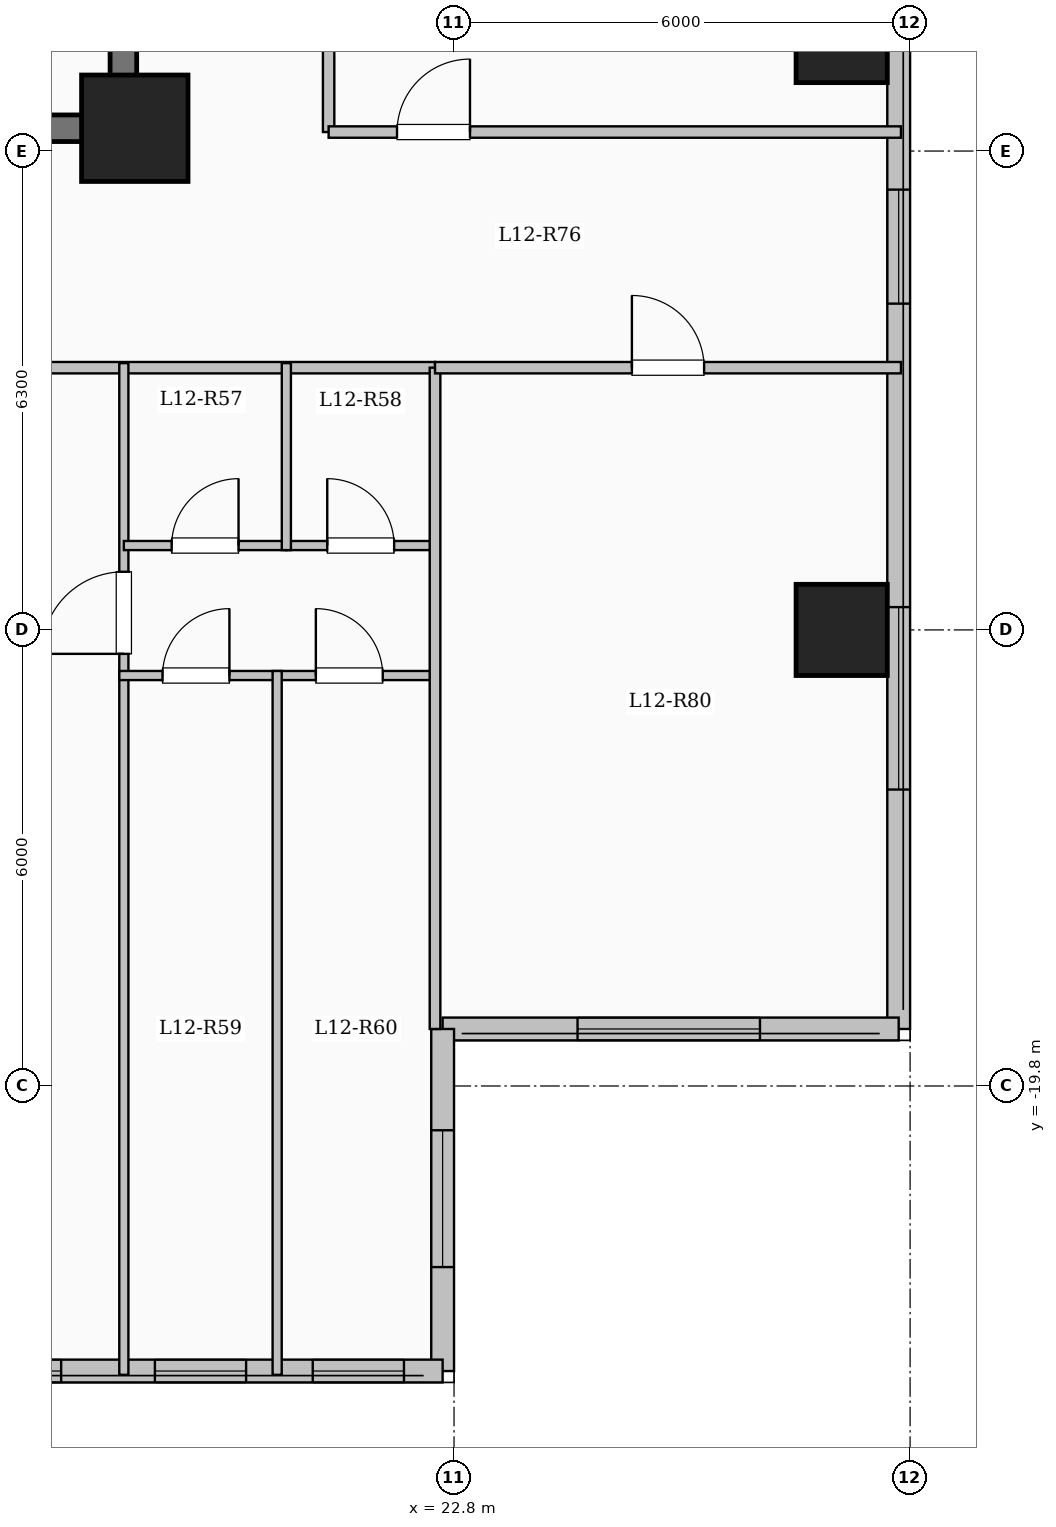
"""IFC4 building model, lengths in metres.
Left out: names, types, materials, properties, quantities, classifications, styles, units other than length and angle.
Written with IfcOpenShell. Run it as: python <this file> out.ifc"""

import sys

from ifc_helpers import new_model, si_unit, direction, frame, frame_2d, origin, origin_2d, place, context, subcontext, project, spatial, rectangle, extrude, element, fill, save


model = new_model("IFC4")
c1 = context("Model", 3, precision=1e-05, world=origin(), true_north=direction((0.0, 1.0)))
c2 = subcontext(c1, "Body", "Model", "MODEL_VIEW")
j1 = project(units=[si_unit("LENGTHUNIT", "METRE"), si_unit("PLANEANGLEUNIT", "RADIAN")], contexts=[c1])
p1 = place(None, origin())
s1 = spatial("IfcSite", under=j1, at=p1, CompositionType="ELEMENT")
p2 = place(p1, origin())
s2 = spatial("IfcBuilding", under=s1, at=p2, CompositionType="ELEMENT")
p3 = place(p2, frame((0.0, 0.0, 47.45)))
s3 = spatial("IfcBuildingStorey", under=s2, at=p3, CompositionType="ELEMENT", Elevation=47.45)
p4 = place(p3, frame((18.6, -7.2, 0.0), z_axis=(0.0, 0.0, 1.0), x_axis=(1.0, 0.0, 0.0)))
e1 = element("IfcColumn", 1, at=p4, inside=s3, PredefinedType="COLUMN", context=c2, shape_type="SweptSolid", body=[
    extrude(rectangle(XDim=1.4, YDim=1.4, at=origin_2d()), origin(), (0.0, 0.0, 1.0), 3.35),
])
for number, where, z_axis, x_axis in (
    (2, (27.9, -13.8, 0.0), (0.0, 0.0, 1.0), (1.0, 0.0, 0.0)),
    (3, (27.9, -6.0, 0.0), (0.0, 0.0, 1.0), (1.0, 0.0, 0.0)),
):
    element("IfcColumn", number, at=place(p3, frame(where, z_axis=z_axis, x_axis=x_axis)), inside=s3, PredefinedType="COLUMN", context=c2, shape_type="SweptSolid", body=[
        extrude(rectangle(XDim=1.2, YDim=1.2, at=origin_2d()), origin(), (0.0, 0.0, 1.0), 3.35),
    ])
p5 = place(p3, frame((28.65, 19.05, 0.0), z_axis=(0.0, 0.0, 1.0), x_axis=(0.0, -1.0, 0.0)))
e4 = element("IfcWall", 4, at=p5, inside=s3, PredefinedType="SOLIDWALL", context=c2, shape_type="SweptSolid", body=[
    extrude(rectangle(XDim=38.1, YDim=0.3, at=frame_2d((19.05, 0.0))), origin(), (0.0, 0.0, 1.0), 3.1),
])
p6 = place(p5, frame((2.275, 0.0, 0.9)))
e5 = element("IfcOpeningElement", 5, at=p6, cuts=e4, PredefinedType="OPENING", context=c2, shape_type="SweptSolid", body=[
    extrude(rectangle(XDim=2.0, YDim=1.7, at=frame_2d((1.0, 0.85))), frame((0.0, 0.16, 0.0), z_axis=(0.0, -1.0, 0.0), x_axis=(1.0, 0.0, 0.0)), (0.0, 0.0, 1.0), 0.32),
])
p7 = place(p5, frame((6.925, 0.0, 0.95)))
e6 = element("IfcOpeningElement", 6, at=p7, cuts=e4, PredefinedType="OPENING", context=c2, shape_type="SweptSolid", body=[
    extrude(rectangle(XDim=1.0, YDim=1.5, at=frame_2d((0.5, 0.75))), frame((0.0, 0.16, 0.0), z_axis=(0.0, -1.0, 0.0), x_axis=(1.0, 0.0, 0.0)), (0.0, 0.0, 1.0), 0.32),
])
p8 = place(p5, frame((10.175, 0.0, 0.9)))
e7 = element("IfcOpeningElement", 7, at=p8, cuts=e4, PredefinedType="OPENING", context=c2, shape_type="SweptSolid", body=[
    extrude(rectangle(XDim=2.0, YDim=1.7, at=frame_2d((1.0, 0.85))), frame((0.0, 0.16, 0.0), z_axis=(0.0, -1.0, 0.0), x_axis=(1.0, 0.0, 0.0)), (0.0, 0.0, 1.0), 0.32),
])
p9 = place(p5, frame((14.925, 0.0, 0.9)))
e8 = element("IfcOpeningElement", 8, at=p9, cuts=e4, PredefinedType="OPENING", context=c2, shape_type="SweptSolid", body=[
    extrude(rectangle(XDim=1.8, YDim=1.65, at=frame_2d((0.9, 0.825))), frame((0.0, 0.16, 0.0), z_axis=(0.0, -1.0, 0.0), x_axis=(1.0, 0.0, 0.0)), (0.0, 0.0, 1.0), 0.32),
])
p10 = place(p5, frame((20.75, 0.0, 0.9)))
e9 = element("IfcOpeningElement", 9, at=p10, cuts=e4, PredefinedType="OPENING", context=c2, shape_type="SweptSolid", body=[
    extrude(rectangle(XDim=2.4, YDim=1.8, at=frame_2d((1.2, 0.9))), frame((0.0, 0.16, 0.0), z_axis=(0.0, -1.0, 0.0), x_axis=(1.0, 0.0, 0.0)), (0.0, 0.0, 1.0), 0.32),
])
p11 = place(p5, frame((27.058, 0.0, 0.9)))
e10 = element("IfcOpeningElement", 10, at=p11, cuts=e4, PredefinedType="OPENING", context=c2, shape_type="SweptSolid", body=[
    extrude(rectangle(XDim=1.5, YDim=1.65, at=frame_2d((0.75, 0.825))), frame((0.0, 0.16, 0.0), z_axis=(0.0, -1.0, 0.0), x_axis=(1.0, 0.0, 0.0)), (0.0, 0.0, 1.0), 0.32),
])
p12 = place(p5, frame((32.55, 0.0, 0.9)))
e11 = element("IfcOpeningElement", 11, at=p12, cuts=e4, PredefinedType="OPENING", context=c2, shape_type="SweptSolid", body=[
    extrude(rectangle(XDim=2.4, YDim=1.8, at=frame_2d((1.2, 0.9))), frame((0.0, 0.16, 0.0), z_axis=(0.0, -1.0, 0.0), x_axis=(1.0, 0.0, 0.0)), (0.0, 0.0, 1.0), 0.32),
])
p13 = place(p3, frame((28.65, -19.05, 0.0), z_axis=(0.0, 0.0, 1.0), x_axis=(-1.0, 0.0, 0.0)))
e12 = element("IfcWall", 12, at=p13, inside=s3, PredefinedType="SOLIDWALL", context=c2, shape_type="SweptSolid", body=[
    extrude(rectangle(XDim=6.0, YDim=0.3, at=frame_2d((3.0, 0.0))), origin(), (0.0, 0.0, 1.0), 3.1),
])
p14 = place(p13, frame((1.825, 0.0, 0.9)))
e13 = element("IfcOpeningElement", 13, at=p14, cuts=e12, PredefinedType="OPENING", context=c2, shape_type="SweptSolid", body=[
    extrude(rectangle(XDim=2.4, YDim=1.8, at=frame_2d((1.2, 0.9))), frame((0.0, 0.16, 0.0), z_axis=(0.0, -1.0, 0.0), x_axis=(1.0, 0.0, 0.0)), (0.0, 0.0, 1.0), 0.32),
])
p15 = place(p3, frame((22.65, -19.05, 0.0), z_axis=(0.0, 0.0, 1.0), x_axis=(0.0, -1.0, 0.0)))
e14 = element("IfcWall", 14, at=p15, inside=s3, PredefinedType="SOLIDWALL", context=c2, shape_type="SweptSolid", body=[
    extrude(rectangle(XDim=4.5, YDim=0.3, at=frame_2d((2.25, 0.0))), origin(), (0.0, 0.0, 1.0), 3.1),
])
p16 = place(p15, frame((1.333, 0.0, 0.9)))
e15 = element("IfcOpeningElement", 15, at=p16, cuts=e14, PredefinedType="OPENING", context=c2, shape_type="SweptSolid", body=[
    extrude(rectangle(XDim=1.8, YDim=1.65, at=frame_2d((0.9, 0.825))), frame((0.0, 0.16, 0.0), z_axis=(0.0, -1.0, 0.0), x_axis=(1.0, 0.0, 0.0)), (0.0, 0.0, 1.0), 0.32),
])
p17 = place(p3, frame((22.65, -23.55, 0.0), z_axis=(0.0, 0.0, 1.0), x_axis=(-1.0, 0.0, 0.0)))
e16 = element("IfcWall", 16, at=p17, inside=s3, PredefinedType="SOLIDWALL", context=c2, shape_type="SweptSolid", body=[
    extrude(rectangle(XDim=15.3, YDim=0.3, at=frame_2d((7.65, 0.0))), origin(), (0.0, 0.0, 1.0), 3.1),
])
p18 = place(p17, frame((0.509, 0.0, 0.95)))
e17 = element("IfcOpeningElement", 17, at=p18, cuts=e16, PredefinedType="OPENING", context=c2, shape_type="SweptSolid", body=[
    extrude(rectangle(XDim=1.2, YDim=1.5, at=frame_2d((0.6, 0.75))), frame((0.0, 0.16, 0.0), z_axis=(0.0, -1.0, 0.0), x_axis=(1.0, 0.0, 0.0)), (0.0, 0.0, 1.0), 0.32),
])
p19 = place(p17, frame((2.585, 0.0, 0.95)))
e18 = element("IfcOpeningElement", 18, at=p19, cuts=e16, PredefinedType="OPENING", context=c2, shape_type="SweptSolid", body=[
    extrude(rectangle(XDim=1.2, YDim=1.5, at=frame_2d((0.6, 0.75))), frame((0.0, 0.16, 0.0), z_axis=(0.0, -1.0, 0.0), x_axis=(1.0, 0.0, 0.0)), (0.0, 0.0, 1.0), 0.32),
])
p20 = place(p17, frame((5.019, 0.0, 0.9)))
e19 = element("IfcOpeningElement", 19, at=p20, cuts=e16, PredefinedType="OPENING", context=c2, shape_type="SweptSolid", body=[
    extrude(rectangle(XDim=1.5, YDim=1.65, at=frame_2d((0.75, 0.825))), frame((0.0, 0.16, 0.0), z_axis=(0.0, -1.0, 0.0), x_axis=(1.0, 0.0, 0.0)), (0.0, 0.0, 1.0), 0.32),
])
p21 = place(p17, frame((8.204, 0.0, 0.9)))
e20 = element("IfcOpeningElement", 20, at=p21, cuts=e16, PredefinedType="OPENING", context=c2, shape_type="SweptSolid", body=[
    extrude(rectangle(XDim=1.5, YDim=1.65, at=frame_2d((0.75, 0.825))), frame((0.0, 0.16, 0.0), z_axis=(0.0, -1.0, 0.0), x_axis=(1.0, 0.0, 0.0)), (0.0, 0.0, 1.0), 0.32),
])
p22 = place(p17, frame((11.415, 0.0, 0.9)))
e21 = element("IfcOpeningElement", 21, at=p22, cuts=e16, PredefinedType="OPENING", context=c2, shape_type="SweptSolid", body=[
    extrude(rectangle(XDim=1.8, YDim=1.65, at=frame_2d((0.9, 0.825))), frame((0.0, 0.16, 0.0), z_axis=(0.0, -1.0, 0.0), x_axis=(1.0, 0.0, 0.0)), (0.0, 0.0, 1.0), 0.32),
])
p23 = place(p17, frame((14.303, 0.0, 0.95)))
e22 = element("IfcOpeningElement", 22, at=p23, cuts=e16, PredefinedType="OPENING", context=c2, shape_type="SweptSolid", body=[
    extrude(rectangle(XDim=0.85, YDim=1.5, at=frame_2d((0.425, 0.75))), frame((0.0, 0.16, 0.0), z_axis=(0.0, -1.0, 0.0), x_axis=(1.0, 0.0, 0.0)), (0.0, 0.0, 1.0), 0.32),
])
p24 = place(p3, frame((18.45, -7.375, 0.0), z_axis=(0.0, 0.0, 1.0), x_axis=(0.0, 1.0, 0.0)))
e23 = element("IfcWall", 23, at=p24, inside=s3, PredefinedType="SHEAR", context=c2, shape_type="SweptSolid", body=[
    extrude(rectangle(XDim=14.05, YDim=0.35, at=frame_2d((7.025, 0.0))), origin(), (0.0, 0.0, 1.0), 3.35),
])
p25 = place(p3, frame((10.075, -7.2, 0.0), z_axis=(0.0, 0.0, 1.0), x_axis=(1.0, 0.0, 0.0)))
e24 = element("IfcWall", 24, at=p25, inside=s3, PredefinedType="SHEAR", context=c2, shape_type="SweptSolid", body=[
    extrude(rectangle(XDim=8.55, YDim=0.35, at=frame_2d((4.275, 0.0))), origin(), (0.0, 0.0, 1.0), 3.35),
])
p26 = place(p3, frame((21.15, -7.25, 0.0), z_axis=(0.0, 0.0, 1.0), x_axis=(0.0, 1.0, 0.0)))
e25 = element("IfcWall", 25, at=p26, inside=s3, PredefinedType="PARTITIONING", context=c2, shape_type="SweptSolid", body=[
    extrude(rectangle(XDim=18.0, YDim=0.15, at=frame_2d((9.0, 0.0))), origin(), (0.0, 0.0, 1.0), 2.585),
])
p27 = place(p3, frame((8.55, -10.35, 0.0), z_axis=(0.0, 0.0, 1.0), x_axis=(1.0, 0.0, 0.0)))
e26 = element("IfcWall", 26, at=p27, inside=s3, PredefinedType="PARTITIONING", context=c2, shape_type="SweptSolid", body=[
    extrude(rectangle(XDim=14.0, YDim=0.15, at=frame_2d((7.0, 0.0))), origin(), (0.0, 0.0, 1.0), 3.1),
])
p28 = place(p27, frame((0.75, 0.0, 0.0)))
e27 = element("IfcOpeningElement", 27, at=p28, cuts=e26, PredefinedType="OPENING", context=c2, shape_type="SweptSolid", body=[
    extrude(rectangle(XDim=0.96, YDim=2.15, at=frame_2d((0.48, 1.075))), frame((0.0, 0.085, 0.0), z_axis=(0.0, -1.0, 0.0), x_axis=(1.0, 0.0, 0.0)), (0.0, 0.0, 1.0), 0.17),
])
p29 = place(p27, frame((7.446, 0.0, 0.0)))
e28 = element("IfcOpeningElement", 28, at=p29, cuts=e26, PredefinedType="OPENING", context=c2, shape_type="SweptSolid", body=[
    extrude(rectangle(XDim=0.96, YDim=2.15, at=frame_2d((0.48, 1.075))), frame((0.0, 0.085, 0.0), z_axis=(0.0, -1.0, 0.0), x_axis=(1.0, 0.0, 0.0)), (0.0, 0.0, 1.0), 0.17),
])
p30 = place(p3, frame((18.456, -23.6, 0.0), z_axis=(0.0, 0.0, 1.0), x_axis=(0.0, 1.0, 0.0)))
e29 = element("IfcWall", 29, at=p30, inside=s3, PredefinedType="PARTITIONING", context=c2, shape_type="SweptSolid", body=[
    extrude(rectangle(XDim=13.31, YDim=0.12, at=frame_2d((6.655, 0.0))), origin(), (0.0, 0.0, 1.0), 3.1),
])
p31 = place(p30, frame((9.485, 0.0, 0.0)))
e30 = element("IfcOpeningElement", 30, at=p31, cuts=e29, PredefinedType="OPENING", context=c2, shape_type="SweptSolid", body=[
    extrude(rectangle(XDim=1.08, YDim=2.15, at=frame_2d((0.54, 1.075))), frame((0.0, 0.07, 0.0), z_axis=(0.0, -1.0, 0.0), x_axis=(1.0, 0.0, 0.0)), (0.0, 0.0, 1.0), 0.14),
])
p32 = place(p3, frame((18.456, -12.69, 0.0), z_axis=(0.0, 0.0, 1.0), x_axis=(1.0, 0.0, 0.0)))
e31 = element("IfcWall", 31, at=p32, inside=s3, PredefinedType="PARTITIONING", context=c2, shape_type="SweptSolid", body=[
    extrude(rectangle(XDim=2.138, YDim=0.12, at=frame_2d((1.069, 0.0))), origin(), (0.0, 0.0, 1.0), 3.1),
])
p33 = place(p32, frame((0.629, 0.0, 0.0)))
e32 = element("IfcOpeningElement", 32, at=p33, cuts=e31, PredefinedType="OPENING", context=c2, shape_type="SweptSolid", body=[
    extrude(rectangle(XDim=0.88, YDim=2.1, at=frame_2d((0.44, 1.05))), frame((0.0, 0.07, 0.0), z_axis=(0.0, -1.0, 0.0), x_axis=(1.0, 0.0, 0.0)), (0.0, 0.0, 1.0), 0.14),
])
p34 = place(p3, frame((20.594, -12.69, 0.0), z_axis=(0.0, 0.0, 1.0), x_axis=(1.0, 0.0, 0.0)))
e33 = element("IfcWall", 33, at=p34, inside=s3, PredefinedType="PARTITIONING", context=c2, shape_type="SweptSolid", body=[
    extrude(rectangle(XDim=1.956, YDim=0.12, at=frame_2d((0.978, 0.0))), origin(), (0.0, 0.0, 1.0), 3.1),
])
p35 = place(p34, frame((0.538, 0.0, 0.0)))
e34 = element("IfcOpeningElement", 34, at=p35, cuts=e33, PredefinedType="OPENING", context=c2, shape_type="SweptSolid", body=[
    extrude(rectangle(XDim=0.88, YDim=2.1, at=frame_2d((0.44, 1.05))), frame((0.0, 0.07, 0.0), z_axis=(0.0, -1.0, 0.0), x_axis=(1.0, 0.0, 0.0)), (0.0, 0.0, 1.0), 0.14),
])
p36 = place(p3, frame((18.396, -14.4, 0.0), z_axis=(0.0, 0.0, 1.0), x_axis=(1.0, 0.0, 0.0)))
e35 = element("IfcWall", 35, at=p36, inside=s3, PredefinedType="PARTITIONING", context=c2, shape_type="SweptSolid", body=[
    extrude(rectangle(XDim=4.214, YDim=0.12, at=frame_2d((2.107, 0.0))), origin(), (0.0, 0.0, 1.0), 3.1),
])
p37 = place(p36, frame((0.569, 0.0, 0.0)))
e36 = element("IfcOpeningElement", 36, at=p37, cuts=e35, PredefinedType="OPENING", context=c2, shape_type="SweptSolid", body=[
    extrude(rectangle(XDim=0.88, YDim=2.1, at=frame_2d((0.44, 1.05))), frame((0.0, 0.07, 0.0), z_axis=(0.0, -1.0, 0.0), x_axis=(1.0, 0.0, 0.0)), (0.0, 0.0, 1.0), 0.14),
])
p38 = place(p36, frame((2.586, 0.0, 0.0)))
e37 = element("IfcOpeningElement", 37, at=p38, cuts=e35, PredefinedType="OPENING", context=c2, shape_type="SweptSolid", body=[
    extrude(rectangle(XDim=0.88, YDim=2.1, at=frame_2d((0.44, 1.05))), frame((0.0, 0.07, 0.0), z_axis=(0.0, -1.0, 0.0), x_axis=(1.0, 0.0, 0.0)), (0.0, 0.0, 1.0), 0.14),
])
p39 = place(p3, frame((20.594, -12.75, 0.0), z_axis=(0.0, 0.0, 1.0), x_axis=(0.0, 1.0, 0.0)))
e38 = element("IfcWall", 38, at=p39, inside=s3, PredefinedType="PARTITIONING", context=c2, shape_type="SweptSolid", body=[
    extrude(rectangle(XDim=2.46, YDim=0.12, at=frame_2d((1.23, 0.0))), origin(), (0.0, 0.0, 1.0), 3.1),
])
p40 = place(p3, frame((20.473, -23.6, 0.0), z_axis=(0.0, 0.0, 1.0), x_axis=(0.0, 1.0, 0.0)))
e39 = element("IfcWall", 39, at=p40, inside=s3, PredefinedType="PARTITIONING", context=c2, shape_type="SweptSolid", body=[
    extrude(rectangle(XDim=9.26, YDim=0.12, at=frame_2d((4.63, 0.0))), origin(), (0.0, 0.0, 1.0), 3.1),
])
p41 = place(p3, frame((21.15, -7.25, 0.0), z_axis=(0.0, 0.0, 1.0), x_axis=(1.0, 0.0, 0.0)))
e40 = element("IfcWall", 40, at=p41, inside=s3, PredefinedType="PARTITIONING", context=c2, shape_type="SweptSolid", body=[
    extrude(rectangle(XDim=7.53, YDim=0.15, at=frame_2d((3.765, 0.0))), origin(), (0.0, 0.0, 1.0), 3.1),
])
p42 = place(p41, frame((0.9, 0.0, 0.0)))
e41 = element("IfcOpeningElement", 41, at=p42, cuts=e40, PredefinedType="OPENING", context=c2, shape_type="SweptSolid", body=[
    extrude(rectangle(XDim=0.96, YDim=2.15, at=frame_2d((0.48, 1.075))), frame((0.0, 0.085, 0.0), z_axis=(0.0, -1.0, 0.0), x_axis=(1.0, 0.0, 0.0)), (0.0, 0.0, 1.0), 0.17),
])
p43 = place(p3, frame((22.55, -19.05, 0.0), z_axis=(0.0, 0.0, 1.0), x_axis=(0.0, 1.0, 0.0)))
e42 = element("IfcWall", 42, at=p43, inside=s3, PredefinedType="PARTITIONING", context=c2, shape_type="SweptSolid", body=[
    extrude(rectangle(XDim=8.7, YDim=0.14, at=frame_2d((4.35, 0.0))), origin(), (0.0, 0.0, 1.0), 3.1),
])
p44 = place(p3, frame((22.55, -10.35, 0.0), z_axis=(0.0, 0.0, 1.0), x_axis=(1.0, 0.0, 0.0)))
e43 = element("IfcWall", 43, at=p44, inside=s3, PredefinedType="PARTITIONING", context=c2, shape_type="SweptSolid", body=[
    extrude(rectangle(XDim=6.13, YDim=0.15, at=frame_2d((3.065, 0.0))), origin(), (0.0, 0.0, 1.0), 3.1),
])
p45 = place(p44, frame((2.59, 0.0, 0.0)))
e44 = element("IfcOpeningElement", 44, at=p45, cuts=e43, PredefinedType="OPENING", context=c2, shape_type="SweptSolid", body=[
    extrude(rectangle(XDim=0.95, YDim=2.15, at=frame_2d((0.475, 1.075))), frame((0.0, 0.085, 0.0), z_axis=(0.0, -1.0, 0.0), x_axis=(1.0, 0.0, 0.0)), (0.0, 0.0, 1.0), 0.17),
])
p46 = place(p11, origin())
e45 = element("IfcWindow", 45, at=p46, inside=s3, PartitioningType="SINGLE_PANEL", PredefinedType="WINDOW", context=c2, shape_type="SweptSolid", body=[
    extrude(rectangle(XDim=1.5, YDim=1.65, at=frame_2d((0.75, 0.825))), frame((0.0, 0.03, 0.0), z_axis=(0.0, -1.0, 0.0), x_axis=(1.0, 0.0, 0.0)), (0.0, 0.0, 1.0), 0.06),
])
fill(e10, e45)
p47 = place(p12, origin())
e46 = element("IfcWindow", 46, at=p47, inside=s3, PartitioningType="SINGLE_PANEL", PredefinedType="WINDOW", context=c2, shape_type="SweptSolid", body=[
    extrude(rectangle(XDim=2.4, YDim=1.8, at=frame_2d((1.2, 0.9))), frame((0.0, 0.03, 0.0), z_axis=(0.0, -1.0, 0.0), x_axis=(1.0, 0.0, 0.0)), (0.0, 0.0, 1.0), 0.06),
])
fill(e11, e46)
p48 = place(p14, origin())
e47 = element("IfcWindow", 47, at=p48, inside=s3, PartitioningType="SINGLE_PANEL", PredefinedType="WINDOW", context=c2, shape_type="SweptSolid", body=[
    extrude(rectangle(XDim=2.4, YDim=1.8, at=frame_2d((1.2, 0.9))), frame((0.0, 0.03, 0.0), z_axis=(0.0, -1.0, 0.0), x_axis=(1.0, 0.0, 0.0)), (0.0, 0.0, 1.0), 0.06),
])
fill(e13, e47)
p49 = place(p16, origin())
e48 = element("IfcWindow", 48, at=p49, inside=s3, PartitioningType="SINGLE_PANEL", PredefinedType="WINDOW", context=c2, shape_type="SweptSolid", body=[
    extrude(rectangle(XDim=1.8, YDim=1.65, at=frame_2d((0.9, 0.825))), frame((0.0, 0.03, 0.0), z_axis=(0.0, -1.0, 0.0), x_axis=(1.0, 0.0, 0.0)), (0.0, 0.0, 1.0), 0.06),
])
fill(e15, e48)
p50 = place(p18, origin())
e49 = element("IfcWindow", 49, at=p50, inside=s3, PartitioningType="SINGLE_PANEL", PredefinedType="WINDOW", context=c2, shape_type="SweptSolid", body=[
    extrude(rectangle(XDim=1.2, YDim=1.5, at=frame_2d((0.6, 0.75))), frame((0.0, 0.03, 0.0), z_axis=(0.0, -1.0, 0.0), x_axis=(1.0, 0.0, 0.0)), (0.0, 0.0, 1.0), 0.06),
])
fill(e17, e49)
p51 = place(p19, origin())
e50 = element("IfcWindow", 50, at=p51, inside=s3, PartitioningType="SINGLE_PANEL", PredefinedType="WINDOW", context=c2, shape_type="SweptSolid", body=[
    extrude(rectangle(XDim=1.2, YDim=1.5, at=frame_2d((0.6, 0.75))), frame((0.0, 0.03, 0.0), z_axis=(0.0, -1.0, 0.0), x_axis=(1.0, 0.0, 0.0)), (0.0, 0.0, 1.0), 0.06),
])
fill(e18, e50)
p52 = place(p20, origin())
e51 = element("IfcWindow", 51, at=p52, inside=s3, PartitioningType="SINGLE_PANEL", PredefinedType="WINDOW", context=c2, shape_type="SweptSolid", body=[
    extrude(rectangle(XDim=1.5, YDim=1.65, at=frame_2d((0.75, 0.825))), frame((0.0, 0.03, 0.0), z_axis=(0.0, -1.0, 0.0), x_axis=(1.0, 0.0, 0.0)), (0.0, 0.0, 1.0), 0.06),
])
fill(e19, e51)
p53 = place(p31, origin())
e52 = element("IfcDoor", 52, at=p53, inside=s3, OperationType="SINGLE_SWING_LEFT", PredefinedType="DOOR", context=c2, shape_type="SweptSolid", body=[
    extrude(rectangle(XDim=1.08, YDim=2.15, at=frame_2d((0.54, 1.075))), frame((0.0, 0.025, 0.0), z_axis=(0.0, -1.0, 0.0), x_axis=(1.0, 0.0, 0.0)), (0.0, 0.0, 1.0), 0.05),
])
fill(e30, e52)
p54 = place(p33, origin())
e53 = element("IfcDoor", 53, at=p54, inside=s3, OperationType="SINGLE_SWING_RIGHT", PredefinedType="DOOR", context=c2, shape_type="SweptSolid", body=[
    extrude(rectangle(XDim=0.88, YDim=2.1, at=frame_2d((0.44, 1.05))), frame((0.0, 0.025, 0.0), z_axis=(0.0, -1.0, 0.0), x_axis=(1.0, 0.0, 0.0)), (0.0, 0.0, 1.0), 0.05),
])
fill(e32, e53)
p55 = place(p35, origin())
e54 = element("IfcDoor", 54, at=p55, inside=s3, OperationType="SINGLE_SWING_LEFT", PredefinedType="DOOR", context=c2, shape_type="SweptSolid", body=[
    extrude(rectangle(XDim=0.88, YDim=2.1, at=frame_2d((0.44, 1.05))), frame((0.0, 0.025, 0.0), z_axis=(0.0, -1.0, 0.0), x_axis=(1.0, 0.0, 0.0)), (0.0, 0.0, 1.0), 0.05),
])
fill(e34, e54)
p56 = place(p37, origin())
e55 = element("IfcDoor", 55, at=p56, inside=s3, OperationType="SINGLE_SWING_RIGHT", PredefinedType="DOOR", context=c2, shape_type="SweptSolid", body=[
    extrude(rectangle(XDim=0.88, YDim=2.1, at=frame_2d((0.44, 1.05))), frame((0.0, 0.025, 0.0), z_axis=(0.0, -1.0, 0.0), x_axis=(1.0, 0.0, 0.0)), (0.0, 0.0, 1.0), 0.05),
])
fill(e36, e55)
p57 = place(p38, origin())
e56 = element("IfcDoor", 56, at=p57, inside=s3, OperationType="SINGLE_SWING_LEFT", PredefinedType="DOOR", context=c2, shape_type="SweptSolid", body=[
    extrude(rectangle(XDim=0.88, YDim=2.1, at=frame_2d((0.44, 1.05))), frame((0.0, 0.025, 0.0), z_axis=(0.0, -1.0, 0.0), x_axis=(1.0, 0.0, 0.0)), (0.0, 0.0, 1.0), 0.05),
])
fill(e37, e56)
p58 = place(p45, origin())
e57 = element("IfcDoor", 57, at=p58, inside=s3, OperationType="SINGLE_SWING_LEFT", PredefinedType="DOOR", context=c2, shape_type="SweptSolid", body=[
    extrude(rectangle(XDim=0.95, YDim=2.15, at=frame_2d((0.475, 1.075))), frame((0.0, 0.025, 0.0), z_axis=(0.0, -1.0, 0.0), x_axis=(1.0, 0.0, 0.0)), (0.0, 0.0, 1.0), 0.05),
])
fill(e44, e57)
p59 = place(p42, origin())
e58 = element("IfcDoor", 58, at=p59, inside=s3, OperationType="SINGLE_SWING_RIGHT", PredefinedType="DOOR", context=c2, shape_type="SweptSolid", body=[
    extrude(rectangle(XDim=0.96, YDim=2.15, at=frame_2d((0.48, 1.075))), frame((0.0, 0.025, 0.0), z_axis=(0.0, -1.0, 0.0), x_axis=(1.0, 0.0, 0.0)), (0.0, 0.0, 1.0), 0.05),
])
fill(e41, e58)
save(model, sys.argv[1])
